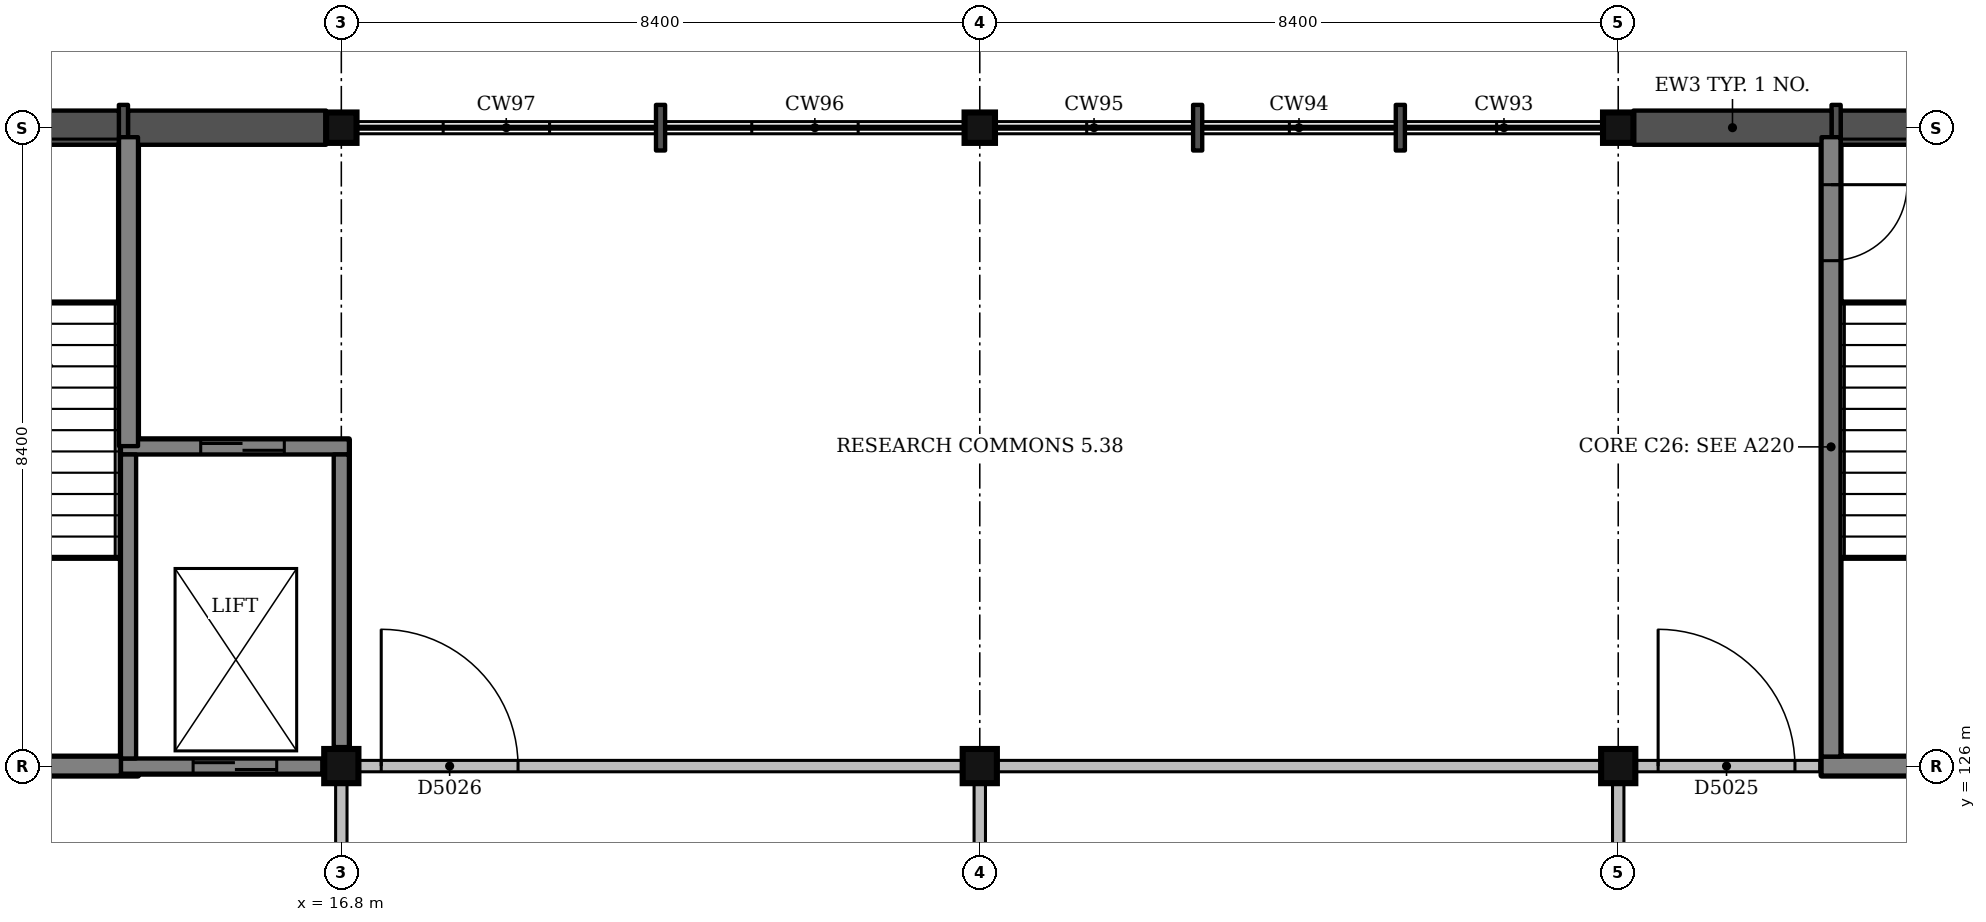
"""IFC4 building model, lengths in metres.
Left out: names, types, materials, properties, quantities, classifications, styles, units other than length and angle.
Written with IfcOpenShell. Run it as: python <this file> out.ifc"""

import sys

from ifc_helpers import new_model, si_unit, direction, frame, frame_2d, origin, origin_2d, place, context, subcontext, project, spatial, rectangle, extrude, element, fill, save


model = new_model("IFC4")
c1 = context("Model", 3, precision=1e-05, world=origin(), true_north=direction((0.0, 1.0)))
c2 = subcontext(c1, "Body", "Model", "MODEL_VIEW")
j1 = project(units=[si_unit("LENGTHUNIT", "METRE"), si_unit("PLANEANGLEUNIT", "RADIAN")], contexts=[c1])
p1 = place(None, origin())
s1 = spatial("IfcSite", under=j1, at=p1, CompositionType="ELEMENT")
p2 = place(p1, origin())
s2 = spatial("IfcBuilding", under=s1, at=p2, CompositionType="ELEMENT")
p3 = place(p2, frame((0.0, 0.0, 22.5)))
s3 = spatial("IfcBuildingStorey", under=s2, at=p3, CompositionType="ELEMENT", Elevation=22.5)
p4 = place(p3, frame((16.8, 126.0, 0.0), z_axis=(0.0, 0.0, 1.0), x_axis=(1.0, 0.0, 0.0)))
e1 = element("IfcColumn", 1, at=p4, inside=s3, PredefinedType="COLUMN", context=c2, shape_type="SweptSolid", body=[
    extrude(rectangle(XDim=0.45, YDim=0.45, at=origin_2d()), origin(), (0.0, 0.0, 1.0), 4.5),
])
p5 = place(p3, frame((16.8, 134.4, 0.0), z_axis=(0.0, 0.0, 1.0), x_axis=(1.0, 0.0, 0.0)))
e2 = element("IfcColumn", 2, at=p5, inside=s3, PredefinedType="COLUMN", context=c2, shape_type="SweptSolid", body=[
    extrude(rectangle(XDim=0.4, YDim=0.4, at=origin_2d()), origin(), (0.0, 0.0, 1.0), 4.5),
])
p6 = place(p3, frame((25.2, 126.0, 0.0), z_axis=(0.0, 0.0, 1.0), x_axis=(1.0, 0.0, 0.0)))
e3 = element("IfcColumn", 3, at=p6, inside=s3, PredefinedType="COLUMN", context=c2, shape_type="SweptSolid", body=[
    extrude(rectangle(XDim=0.45, YDim=0.45, at=origin_2d()), origin(), (0.0, 0.0, 1.0), 4.5),
])
p7 = place(p3, frame((25.2, 134.4, 0.0), z_axis=(0.0, 0.0, 1.0), x_axis=(1.0, 0.0, 0.0)))
e4 = element("IfcColumn", 4, at=p7, inside=s3, PredefinedType="COLUMN", context=c2, shape_type="SweptSolid", body=[
    extrude(rectangle(XDim=0.4, YDim=0.4, at=origin_2d()), origin(), (0.0, 0.0, 1.0), 4.5),
])
p8 = place(p3, frame((33.6, 126.0, 0.0), z_axis=(0.0, 0.0, 1.0), x_axis=(1.0, 0.0, 0.0)))
e5 = element("IfcColumn", 5, at=p8, inside=s3, PredefinedType="COLUMN", context=c2, shape_type="SweptSolid", body=[
    extrude(rectangle(XDim=0.45, YDim=0.45, at=origin_2d()), origin(), (0.0, 0.0, 1.0), 4.5),
])
p9 = place(p3, frame((33.6, 134.4, 0.0), z_axis=(0.0, 0.0, 1.0), x_axis=(1.0, 0.0, 0.0)))
e6 = element("IfcColumn", 6, at=p9, inside=s3, PredefinedType="COLUMN", context=c2, shape_type="SweptSolid", body=[
    extrude(rectangle(XDim=0.4, YDim=0.4, at=origin_2d()), origin(), (0.0, 0.0, 1.0), 4.5),
])
p10 = place(p3, frame((13.9, 126.0, 0.0), z_axis=(0.0, 0.0, 1.0), x_axis=(1.0, 0.0, 0.0)))
e7 = element("IfcWall", 7, at=p10, inside=s3, PredefinedType="SHEAR", context=c2, shape_type="SweptSolid", body=[
    extrude(rectangle(XDim=2.65, YDim=0.2, at=frame_2d((1.325, 0.0))), origin(), (0.0, 0.0, 1.0), 4.5),
])
p11 = place(p10, frame((0.95, 0.0, 0.0)))
e8 = element("IfcOpeningElement", 8, at=p11, cuts=e7, PredefinedType="OPENING", context=c2, shape_type="SweptSolid", body=[
    extrude(rectangle(XDim=1.1, YDim=2.1, at=frame_2d((0.55, 1.05))), frame((0.0, 0.11, 0.0), z_axis=(0.0, -1.0, 0.0), x_axis=(1.0, 0.0, 0.0)), (0.0, 0.0, 1.0), 0.22),
])
p12 = place(p3, frame((13.9, 130.2, 0.0), z_axis=(0.0, 0.0, 1.0), x_axis=(1.0, 0.0, 0.0)))
e9 = element("IfcWall", 9, at=p12, inside=s3, PredefinedType="SHEAR", context=c2, shape_type="SweptSolid", body=[
    extrude(rectangle(XDim=3.0, YDim=0.2, at=frame_2d((1.5, 0.0))), origin(), (0.0, 0.0, 1.0), 4.5),
])
p13 = place(p12, frame((1.05, 0.0, 0.0)))
e10 = element("IfcOpeningElement", 10, at=p13, cuts=e9, PredefinedType="OPENING", context=c2, shape_type="SweptSolid", body=[
    extrude(rectangle(XDim=1.1, YDim=2.1, at=frame_2d((0.55, 1.05))), frame((0.0, 0.11, 0.0), z_axis=(0.0, -1.0, 0.0), x_axis=(1.0, 0.0, 0.0)), (0.0, 0.0, 1.0), 0.22),
])
p14 = place(p3, frame((14.0, 126.1, 0.0), z_axis=(0.0, 0.0, 1.0), x_axis=(0.0, 1.0, 0.0)))
e11 = element("IfcWall", 11, at=p14, inside=s3, PredefinedType="SHEAR", context=c2, shape_type="SweptSolid", body=[
    extrude(rectangle(XDim=4.0, YDim=0.2, at=frame_2d((2.0, 0.0))), origin(), (0.0, 0.0, 1.0), 4.5),
])
p15 = place(p3, frame((16.8, 126.25, 0.0), z_axis=(0.0, 0.0, 1.0), x_axis=(0.0, 1.0, 0.0)))
e12 = element("IfcWall", 12, at=p15, inside=s3, PredefinedType="SHEAR", context=c2, shape_type="SweptSolid", body=[
    extrude(rectangle(XDim=3.85, YDim=0.2, at=frame_2d((1.925, 0.0))), origin(), (0.0, 0.0, 1.0), 4.5),
])
p16 = place(p3, frame((36.275, 126.0, 0.0), z_axis=(0.0, 0.0, 1.0), x_axis=(1.0, 0.0, 0.0)))
e13 = element("IfcWall", 13, at=p16, inside=s3, PredefinedType="SHEAR", context=c2, shape_type="SweptSolid", body=[
    extrude(rectangle(XDim=5.475, YDim=0.25, at=frame_2d((2.738, 0.0))), origin(), (0.0, 0.0, 1.0), 4.5),
])
p17 = place(p3, frame((36.4, 126.125, 0.0), z_axis=(0.0, 0.0, 1.0), x_axis=(0.0, 1.0, 0.0)))
e14 = element("IfcWall", 14, at=p17, inside=s3, PredefinedType="SHEAR", context=c2, shape_type="SweptSolid", body=[
    extrude(rectangle(XDim=8.15, YDim=0.25, at=frame_2d((4.075, 0.0))), origin(), (0.0, 0.0, 1.0), 4.5),
])
p18 = place(p17, frame((6.525, 0.0, 0.0)))
e15 = element("IfcOpeningElement", 15, at=p18, cuts=e14, PredefinedType="OPENING", context=c2, shape_type="SweptSolid", body=[
    extrude(rectangle(XDim=1.0, YDim=2.1, at=frame_2d((0.5, 1.05))), frame((0.0, 0.135, 0.0), z_axis=(0.0, -1.0, 0.0), x_axis=(1.0, 0.0, 0.0)), (0.0, 0.0, 1.0), 0.27),
])
p19 = place(p3, frame((8.65, 126.0, 0.0), z_axis=(0.0, 0.0, 1.0), x_axis=(1.0, 0.0, 0.0)))
e16 = element("IfcWall", 16, at=p19, inside=s3, PredefinedType="SHEAR", context=c2, shape_type="SweptSolid", body=[
    extrude(rectangle(XDim=5.25, YDim=0.25, at=frame_2d((2.625, 0.0))), origin(), (0.0, 0.0, 1.0), 4.5),
])
p20 = place(p3, frame((14.0, 130.21, 0.0), z_axis=(0.0, 0.0, 1.0), x_axis=(0.0, 1.0, 0.0)))
e17 = element("IfcWall", 17, at=p20, inside=s3, PredefinedType="SHEAR", context=c2, shape_type="SweptSolid", body=[
    extrude(rectangle(XDim=4.065, YDim=0.25, at=frame_2d((2.032, 0.0))), origin(), (0.0, 0.0, 1.0), 4.5),
])
p21 = place(p3, frame((39.073, 134.4, 0.0), z_axis=(0.0, 0.0, 1.0), x_axis=(-1.0, 0.0, 0.0)))
e18 = element("IfcWall", 18, at=p21, inside=s3, PredefinedType="SOLIDWALL", context=c2, shape_type="SweptSolid", body=[
    extrude(rectangle(XDim=2.547, YDim=0.45, at=frame_2d((1.273, 0.0))), origin(), (0.0, 0.0, 1.0), 3.35),
])
p22 = place(p3, frame((36.527, 134.4, 0.0), z_axis=(0.0, 0.0, 1.0), x_axis=(-1.0, 0.0, 0.0)))
e19 = element("IfcWall", 19, at=p22, inside=s3, PredefinedType="SOLIDWALL", context=c2, shape_type="SweptSolid", body=[
    extrude(rectangle(XDim=0.12, YDim=0.6, at=frame_2d((0.06, 0.0))), origin(), (0.0, 0.0, 1.0), 3.35),
])
p23 = place(p3, frame((36.407, 134.4, 0.0), z_axis=(0.0, 0.0, 1.0), x_axis=(-1.0, 0.0, 0.0)))
e20 = element("IfcWall", 20, at=p23, inside=s3, PredefinedType="SOLIDWALL", context=c2, shape_type="SweptSolid", body=[
    extrude(rectangle(XDim=2.607, YDim=0.45, at=frame_2d((1.303, 0.0))), origin(), (0.0, 0.0, 1.0), 3.35),
])
p24 = place(p3, frame((30.793, 134.4, 0.0), z_axis=(0.0, 0.0, 1.0), x_axis=(-1.0, 0.0, 0.0)))
e21 = element("IfcWall", 21, at=p24, inside=s3, PredefinedType="SOLIDWALL", context=c2, shape_type="SweptSolid", body=[
    extrude(rectangle(XDim=0.12, YDim=0.6, at=frame_2d((0.06, 0.0))), origin(), (0.0, 0.0, 1.0), 3.35),
])
for number, where, z_axis, x_axis in (
    (22, (28.127, 134.4, 0.0), (0.0, 0.0, 1.0), (-1.0, 0.0, 0.0)),
    (23, (21.06, 134.4, 0.0), (0.0, 0.0, 1.0), (-1.0, 0.0, 0.0)),
):
    element("IfcWall", number, at=place(p3, frame(where, z_axis=z_axis, x_axis=x_axis)), inside=s3, PredefinedType="SOLIDWALL", context=c2, shape_type="SweptSolid", body=[
        extrude(rectangle(XDim=0.12, YDim=0.6, at=frame_2d((0.06, 0.0))), origin(), (0.0, 0.0, 1.0), 3.35),
    ])
p25 = place(p3, frame((16.6, 134.4, 0.0), z_axis=(0.0, 0.0, 1.0), x_axis=(-1.0, 0.0, 0.0)))
e24 = element("IfcWall", 24, at=p25, inside=s3, PredefinedType="SOLIDWALL", context=c2, shape_type="SweptSolid", body=[
    extrude(rectangle(XDim=2.607, YDim=0.45, at=frame_2d((1.303, 0.0))), origin(), (0.0, 0.0, 1.0), 3.35),
])
p26 = place(p3, frame((13.993, 134.4, 0.0), z_axis=(0.0, 0.0, 1.0), x_axis=(-1.0, 0.0, 0.0)))
e25 = element("IfcWall", 25, at=p26, inside=s3, PredefinedType="SOLIDWALL", context=c2, shape_type="SweptSolid", body=[
    extrude(rectangle(XDim=0.12, YDim=0.6, at=frame_2d((0.06, 0.0))), origin(), (0.0, 0.0, 1.0), 3.35),
])
p27 = place(p3, frame((13.873, 134.4, 0.0), z_axis=(0.0, 0.0, 1.0), x_axis=(-1.0, 0.0, 0.0)))
e26 = element("IfcWall", 26, at=p27, inside=s3, PredefinedType="SOLIDWALL", context=c2, shape_type="SweptSolid", body=[
    extrude(rectangle(XDim=2.547, YDim=0.45, at=frame_2d((1.273, 0.0))), origin(), (0.0, 0.0, 1.0), 3.35),
])
p28 = place(p3, frame((17.025, 126.0, 0.0), z_axis=(0.0, 0.0, 1.0), x_axis=(1.0, 0.0, 0.0)))
e27 = element("IfcWall", 27, at=p28, inside=s3, PredefinedType="PARTITIONING", context=c2, shape_type="SweptSolid", body=[
    extrude(rectangle(XDim=7.95, YDim=0.15, at=frame_2d((3.975, 0.0))), origin(), (0.0, 0.0, 1.0), 3.4),
])
p29 = place(p28, frame((0.3, 0.0, 0.0)))
e28 = element("IfcOpeningElement", 28, at=p29, cuts=e27, PredefinedType="OPENING", context=c2, shape_type="SweptSolid", body=[
    extrude(rectangle(XDim=1.8, YDim=2.1, at=frame_2d((0.9, 1.05))), frame((0.0, 0.085, 0.0), z_axis=(0.0, -1.0, 0.0), x_axis=(1.0, 0.0, 0.0)), (0.0, 0.0, 1.0), 0.17),
])
p30 = place(p3, frame((25.425, 126.0, 0.0), z_axis=(0.0, 0.0, 1.0), x_axis=(1.0, 0.0, 0.0)))
e29 = element("IfcWall", 29, at=p30, inside=s3, PredefinedType="PARTITIONING", context=c2, shape_type="SweptSolid", body=[
    extrude(rectangle(XDim=7.95, YDim=0.15, at=frame_2d((3.975, 0.0))), origin(), (0.0, 0.0, 1.0), 3.4),
])
p31 = place(p3, frame((33.825, 126.0, 0.0), z_axis=(0.0, 0.0, 1.0), x_axis=(1.0, 0.0, 0.0)))
e30 = element("IfcWall", 30, at=p31, inside=s3, PredefinedType="PARTITIONING", context=c2, shape_type="SweptSolid", body=[
    extrude(rectangle(XDim=2.425, YDim=0.15, at=frame_2d((1.212, 0.0))), origin(), (0.0, 0.0, 1.0), 3.4),
])
p32 = place(p31, frame((0.3, 0.0, 0.0)))
e31 = element("IfcOpeningElement", 31, at=p32, cuts=e30, PredefinedType="OPENING", context=c2, shape_type="SweptSolid", body=[
    extrude(rectangle(XDim=1.8, YDim=2.1, at=frame_2d((0.9, 1.05))), frame((0.0, 0.085, 0.0), z_axis=(0.0, -1.0, 0.0), x_axis=(1.0, 0.0, 0.0)), (0.0, 0.0, 1.0), 0.17),
])
for number, where, z_axis, x_axis in (
    (32, (16.8, 121.8, 0.0), (0.0, 0.0, 1.0), (0.0, 1.0, 0.0)),
    (33, (25.2, 121.8, 0.0), (0.0, 0.0, 1.0), (0.0, 1.0, 0.0)),
    (34, (33.6, 121.8, 0.0), (0.0, 0.0, 1.0), (0.0, 1.0, 0.0)),
):
    element("IfcWall", number, at=place(p3, frame(where, z_axis=z_axis, x_axis=x_axis)), inside=s3, PredefinedType="PARTITIONING", context=c2, shape_type="SweptSolid", body=[
        extrude(rectangle(XDim=3.975, YDim=0.15, at=frame_2d((1.987, 0.0))), origin(), (0.0, 0.0, 1.0), 3.4),
    ])
p33 = place(p32, origin())
e35 = element("IfcDoor", 35, at=p33, inside=s3, OperationType="DOUBLE_DOOR_SINGLE_SWING", PredefinedType="DOOR", context=c2, shape_type="SweptSolid", body=[
    extrude(rectangle(XDim=1.8, YDim=2.1, at=frame_2d((0.9, 1.05))), frame((0.0, 0.025, 0.0), z_axis=(0.0, -1.0, 0.0), x_axis=(1.0, 0.0, 0.0)), (0.0, 0.0, 1.0), 0.05),
])
fill(e31, e35)
p34 = place(p29, origin())
e36 = element("IfcDoor", 36, at=p34, inside=s3, OperationType="DOUBLE_DOOR_SINGLE_SWING", PredefinedType="DOOR", context=c2, shape_type="SweptSolid", body=[
    extrude(rectangle(XDim=1.8, YDim=2.1, at=frame_2d((0.9, 1.05))), frame((0.0, 0.025, 0.0), z_axis=(0.0, -1.0, 0.0), x_axis=(1.0, 0.0, 0.0)), (0.0, 0.0, 1.0), 0.05),
])
fill(e28, e36)
p35 = place(p18, origin())
e37 = element("IfcDoor", 37, at=p35, inside=s3, OperationType="SINGLE_SWING_RIGHT", PredefinedType="DOOR", context=c2, shape_type="SweptSolid", body=[
    extrude(rectangle(XDim=1.0, YDim=2.1, at=frame_2d((0.5, 1.05))), frame((0.0, 0.025, 0.0), z_axis=(0.0, -1.0, 0.0), x_axis=(1.0, 0.0, 0.0)), (0.0, 0.0, 1.0), 0.05),
])
fill(e15, e37)
p36 = place(p11, origin())
e38 = element("IfcDoor", 38, at=p36, inside=s3, OperationType="SLIDING_TO_RIGHT", PredefinedType="DOOR", context=c2, shape_type="SweptSolid", body=[
    extrude(rectangle(XDim=1.1, YDim=2.1, at=frame_2d((0.55, 1.05))), frame((0.0, 0.025, 0.0), z_axis=(0.0, -1.0, 0.0), x_axis=(1.0, 0.0, 0.0)), (0.0, 0.0, 1.0), 0.05),
])
fill(e8, e38)
p37 = place(p13, origin())
e39 = element("IfcDoor", 39, at=p37, inside=s3, OperationType="SLIDING_TO_LEFT", PredefinedType="DOOR", context=c2, shape_type="SweptSolid", body=[
    extrude(rectangle(XDim=1.1, YDim=2.1, at=frame_2d((0.55, 1.05))), frame((0.0, 0.025, 0.0), z_axis=(0.0, -1.0, 0.0), x_axis=(1.0, 0.0, 0.0)), (0.0, 0.0, 1.0), 0.05),
])
fill(e10, e39)
save(model, sys.argv[1])
